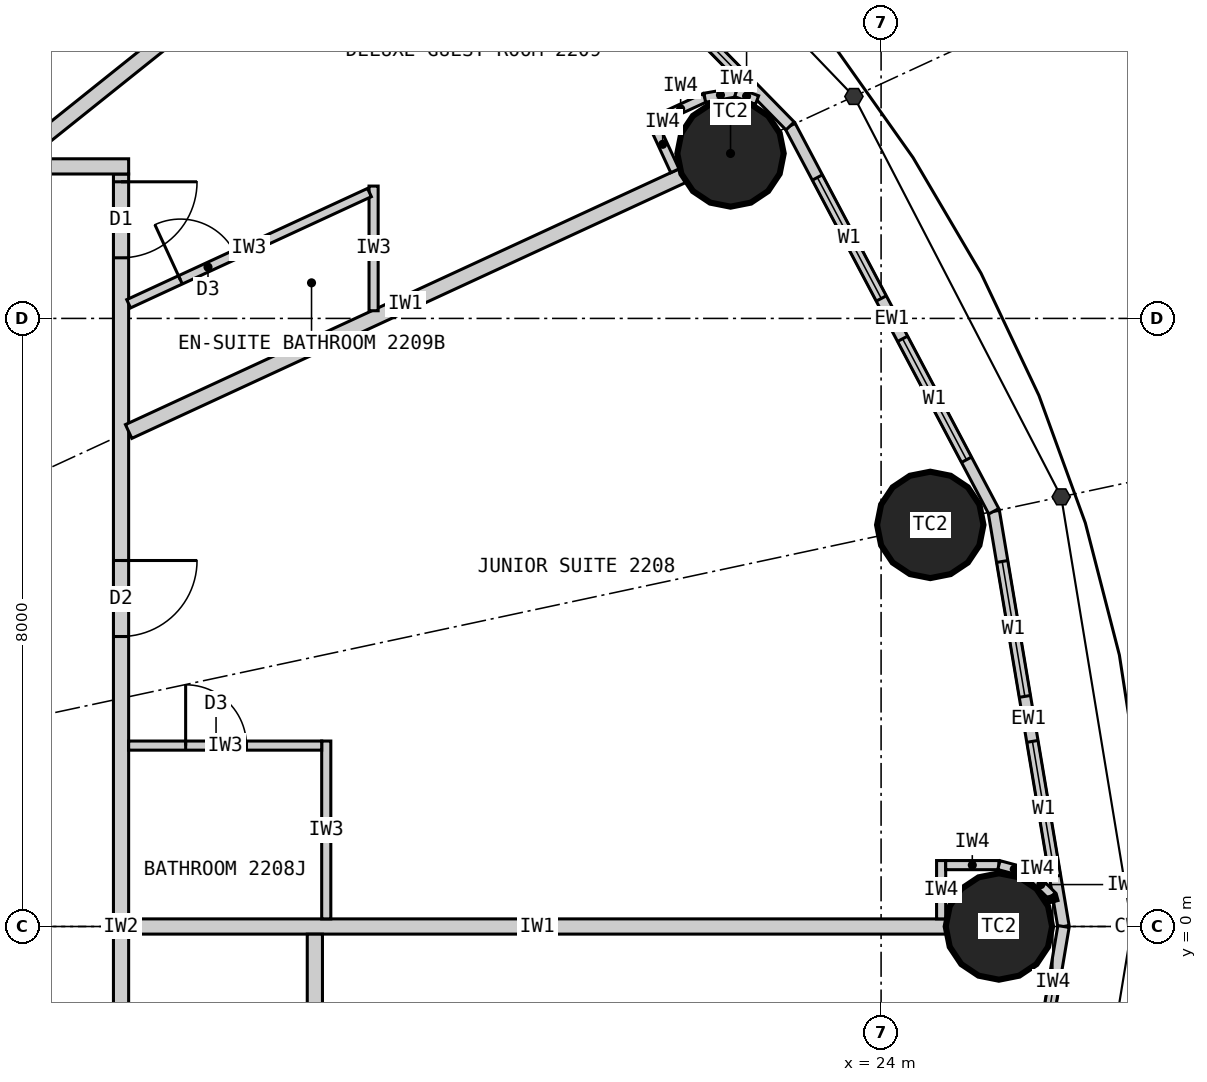
"""IFC4 building model, lengths in metres.
Left out: names, types, materials, properties, quantities, classifications, styles, units other than length and angle.
Written with IfcOpenShell. Run it as: python <this file> out.ifc"""

import sys

from ifc_helpers import new_model, si_unit, direction, frame, frame_2d, origin, origin_2d, place, context, subcontext, project, spatial, rectangle, circle, extrude, element, fill, save


model = new_model("IFC4")
c1 = context("Model", 3, precision=1e-05, world=origin(), true_north=direction((0.0, 1.0)))
c2 = subcontext(c1, "Body", "Model", "MODEL_VIEW")
j1 = project(units=[si_unit("LENGTHUNIT", "METRE"), si_unit("PLANEANGLEUNIT", "RADIAN")], contexts=[c1])
p1 = place(None, origin())
s1 = spatial("IfcSite", under=j1, at=p1, CompositionType="ELEMENT")
p2 = place(p1, origin())
s2 = spatial("IfcBuilding", under=s1, at=p2, CompositionType="ELEMENT")
p3 = place(p2, frame((0.0, 0.0, 87.0)))
s3 = spatial("IfcBuildingStorey", under=s2, at=p3, CompositionType="ELEMENT", Elevation=87.0)
for number, where, z_axis, x_axis in (
    (1, (25.55, 0.0, 0.0), (0.0, 0.0, 1.0), (1.0, 0.0, 0.0)),
    (2, (24.647, 5.283, 0.0), (0.0, 0.0, 1.0), (1.0, 0.0, 0.0)),
    (3, (22.019, 10.17, 0.0), (0.0, 0.0, 1.0), (1.0, 0.0, 0.0)),
):
    element("IfcColumn", number, at=place(p3, frame(where, z_axis=z_axis, x_axis=x_axis)), inside=s3, PredefinedType="COLUMN", context=c2, shape_type="SweptSolid", body=[
        extrude(circle(Radius=0.7, at=origin_2d()), origin(), (0.0, 0.0, 1.0), 3.3),
    ])
p4 = place(p3, frame((26.4, 0.0, 0.0), z_axis=(0.0, 0.0, 1.0), x_axis=(-0.165642551694, 0.986185857264, 0.0)))
e4 = element("IfcWall", 4, at=p4, inside=s3, PredefinedType="ELEMENTEDWALL", context=c2, shape_type="SweptSolid", body=[
    extrude(rectangle(XDim=5.539, YDim=0.15, at=frame_2d((2.77, 0.0))), origin(), (0.0, 0.0, 1.0), 3.12),
])
p5 = place(p4, frame((0.669, 0.0, 0.9)))
e5 = element("IfcOpeningElement", 5, at=p5, cuts=e4, PredefinedType="OPENING", context=c2, shape_type="SweptSolid", body=[
    extrude(rectangle(XDim=1.8, YDim=1.9, at=frame_2d((0.9, 0.95))), frame((0.0, 0.085, 0.0), z_axis=(0.0, -1.0, 0.0), x_axis=(1.0, 0.0, 0.0)), (0.0, 0.0, 1.0), 0.17),
])
p6 = place(p4, frame((3.07, 0.0, 0.9)))
e6 = element("IfcOpeningElement", 6, at=p6, cuts=e4, PredefinedType="OPENING", context=c2, shape_type="SweptSolid", body=[
    extrude(rectangle(XDim=1.8, YDim=1.9, at=frame_2d((0.9, 0.95))), frame((0.0, 0.085, 0.0), z_axis=(0.0, -1.0, 0.0), x_axis=(1.0, 0.0, 0.0)), (0.0, 0.0, 1.0), 0.17),
])
p7 = place(p3, frame((25.482, 5.462, 0.0), z_axis=(0.0, 0.0, 1.0), x_axis=(-0.467296867008, 0.884100468321, 0.0)))
e7 = element("IfcWall", 7, at=p7, inside=s3, PredefinedType="ELEMENTEDWALL", context=c2, shape_type="SweptSolid", body=[
    extrude(rectangle(XDim=5.734, YDim=0.15, at=frame_2d((2.867, 0.0))), origin(), (0.0, 0.0, 1.0), 3.12),
])
p8 = place(p7, frame((0.767, 0.0, 0.9)))
e8 = element("IfcOpeningElement", 8, at=p8, cuts=e7, PredefinedType="OPENING", context=c2, shape_type="SweptSolid", body=[
    extrude(rectangle(XDim=1.8, YDim=1.9, at=frame_2d((0.9, 0.95))), frame((0.0, 0.085, 0.0), z_axis=(0.0, -1.0, 0.0), x_axis=(1.0, 0.0, 0.0)), (0.0, 0.0, 1.0), 0.17),
])
p9 = place(p7, frame((3.167, 0.0, 0.9)))
e9 = element("IfcOpeningElement", 9, at=p9, cuts=e7, PredefinedType="OPENING", context=c2, shape_type="SweptSolid", body=[
    extrude(rectangle(XDim=1.8, YDim=1.9, at=frame_2d((0.9, 0.95))), frame((0.0, 0.085, 0.0), z_axis=(0.0, -1.0, 0.0), x_axis=(1.0, 0.0, 0.0)), (0.0, 0.0, 1.0), 0.17),
])
p10 = place(p3, frame((22.803, 10.532, 0.0), z_axis=(0.0, 0.0, 1.0), x_axis=(-0.699602905915, 0.714531856557, 0.0)))
e10 = element("IfcWall", 10, at=p10, inside=s3, PredefinedType="ELEMENTEDWALL", context=c2, shape_type="SweptSolid", body=[
    extrude(rectangle(XDim=6.051, YDim=0.15, at=frame_2d((3.025, 0.0))), origin(), (0.0, 0.0, 1.0), 3.12),
])
p11 = place(p10, frame((0.926, 0.0, 0.9)))
e11 = element("IfcOpeningElement", 11, at=p11, cuts=e10, PredefinedType="OPENING", context=c2, shape_type="SweptSolid", body=[
    extrude(rectangle(XDim=1.8, YDim=1.9, at=frame_2d((0.9, 0.95))), frame((0.0, 0.085, 0.0), z_axis=(0.0, -1.0, 0.0), x_axis=(1.0, 0.0, 0.0)), (0.0, 0.0, 1.0), 0.17),
])
p12 = place(p10, frame((3.325, 0.0, 0.9)))
e12 = element("IfcOpeningElement", 12, at=p12, cuts=e10, PredefinedType="OPENING", context=c2, shape_type="SweptSolid", body=[
    extrude(rectangle(XDim=1.8, YDim=1.9, at=frame_2d((0.9, 0.95))), frame((0.0, 0.085, 0.0), z_axis=(0.0, -1.0, 0.0), x_axis=(1.0, 0.0, 0.0)), (0.0, 0.0, 1.0), 0.17),
])
p13 = place(p3, frame((25.482, -5.462, 0.0), z_axis=(0.0, 0.0, 1.0), x_axis=(0.165642551694, 0.986185857264, 0.0)))
e13 = element("IfcWall", 13, at=p13, inside=s3, PredefinedType="ELEMENTEDWALL", context=c2, shape_type="SweptSolid", body=[
    extrude(rectangle(XDim=5.539, YDim=0.15, at=frame_2d((2.77, 0.0))), origin(), (0.0, 0.0, 1.0), 3.12),
])
p14 = place(p13, frame((0.669, 0.0, 0.9)))
e14 = element("IfcOpeningElement", 14, at=p14, cuts=e13, PredefinedType="OPENING", context=c2, shape_type="SweptSolid", body=[
    extrude(rectangle(XDim=1.8, YDim=1.9, at=frame_2d((0.9, 0.95))), frame((0.0, 0.085, 0.0), z_axis=(0.0, -1.0, 0.0), x_axis=(1.0, 0.0, 0.0)), (0.0, 0.0, 1.0), 0.17),
])
p15 = place(p13, frame((3.07, 0.0, 0.9)))
e15 = element("IfcOpeningElement", 15, at=p15, cuts=e13, PredefinedType="OPENING", context=c2, shape_type="SweptSolid", body=[
    extrude(rectangle(XDim=1.8, YDim=1.9, at=frame_2d((0.9, 0.95))), frame((0.0, 0.085, 0.0), z_axis=(0.0, -1.0, 0.0), x_axis=(1.0, 0.0, 0.0)), (0.0, 0.0, 1.0), 0.17),
])
p16 = place(p3, frame((14.0, -9.9, 0.0), z_axis=(0.0, 0.0, 1.0), x_axis=(0.0, 1.0, 0.0)))
e16 = element("IfcWall", 16, at=p16, inside=s3, PredefinedType="PARTITIONING", context=c2, shape_type="SweptSolid", body=[
    extrude(rectangle(XDim=19.8, YDim=0.2, at=frame_2d((9.9, 0.0))), origin(), (0.0, 0.0, 1.0), 3.12),
])
p17 = place(p16, frame((0.204, 0.0, 0.0)))
e17 = element("IfcOpeningElement", 17, at=p17, cuts=e16, PredefinedType="OPENING", context=c2, shape_type="SweptSolid", body=[
    extrude(rectangle(XDim=1.0, YDim=2.2, at=frame_2d((0.5, 1.1))), frame((0.0, 0.11, 0.0), z_axis=(0.0, -1.0, 0.0), x_axis=(1.0, 0.0, 0.0)), (0.0, 0.0, 1.0), 0.22),
])
p18 = place(p16, frame((13.715, 0.0, 0.0)))
e18 = element("IfcOpeningElement", 18, at=p18, cuts=e16, PredefinedType="OPENING", context=c2, shape_type="SweptSolid", body=[
    extrude(rectangle(XDim=1.0, YDim=2.2, at=frame_2d((0.5, 1.1))), frame((0.0, 0.11, 0.0), z_axis=(0.0, -1.0, 0.0), x_axis=(1.0, 0.0, 0.0)), (0.0, 0.0, 1.0), 0.22),
])
p19 = place(p16, frame((18.698, 0.0, 0.0)))
e19 = element("IfcOpeningElement", 19, at=p19, cuts=e16, PredefinedType="OPENING", context=c2, shape_type="SweptSolid", body=[
    extrude(rectangle(XDim=1.0, YDim=2.2, at=frame_2d((0.5, 1.1))), frame((0.0, 0.11, 0.0), z_axis=(0.0, -1.0, 0.0), x_axis=(1.0, 0.0, 0.0)), (0.0, 0.0, 1.0), 0.22),
])
p20 = place(p3, frame((14.1, 0.0, 0.0), z_axis=(0.0, 0.0, 1.0), x_axis=(1.0, 0.0, 0.0)))
e20 = element("IfcWall", 20, at=p20, inside=s3, PredefinedType="PARTITIONING", context=c2, shape_type="SweptSolid", body=[
    extrude(rectangle(XDim=10.75, YDim=0.2, at=frame_2d((5.375, 0.0))), origin(), (0.0, 0.0, 1.0), 2.22),
])
p21 = place(p3, frame((14.1, 6.512, 0.0), z_axis=(0.0, 0.0, 1.0), x_axis=(0.907832871056, 0.419332181247, 0.0)))
e21 = element("IfcWall", 21, at=p21, inside=s3, PredefinedType="PARTITIONING", context=c2, shape_type="SweptSolid", body=[
    extrude(rectangle(XDim=8.023, YDim=0.2, at=frame_2d((4.011, 0.0))), origin(), (0.0, 0.0, 1.0), 2.22),
])
p22 = place(p3, frame((12.625, 10.1, 0.0), z_axis=(0.0, 0.0, 1.0), x_axis=(0.780892451574, 0.624665493744, 0.0)))
e22 = element("IfcWall", 22, at=p22, inside=s3, PredefinedType="PARTITIONING", context=c2, shape_type="SweptSolid", body=[
    extrude(rectangle(XDim=6.045, YDim=0.2, at=frame_2d((3.022, 0.0))), origin(), (0.0, 0.0, 1.0), 2.27),
])
p23 = place(p3, frame((16.55, -9.609, 0.0), z_axis=(0.0, 0.0, 1.0), x_axis=(0.0, 1.0, 0.0)))
e23 = element("IfcWall", 23, at=p23, inside=s3, PredefinedType="PARTITIONING", context=c2, shape_type="SweptSolid", body=[
    extrude(rectangle(XDim=9.508, YDim=0.2, at=frame_2d((4.754, 0.0))), origin(), (0.0, 0.0, 1.0), 3.12),
])
p24 = place(p23, frame((6.234, 0.0, 0.0)))
e24 = element("IfcOpeningElement", 24, at=p24, cuts=e23, PredefinedType="OPENING", context=c2, shape_type="SweptSolid", body=[
    extrude(rectangle(XDim=0.8, YDim=2.1, at=frame_2d((0.4, 1.05))), frame((0.0, 0.11, 0.0), z_axis=(0.0, -1.0, 0.0), x_axis=(1.0, 0.0, 0.0)), (0.0, 0.0, 1.0), 0.22),
])
p25 = place(p3, frame((16.7, 0.1, 0.0), z_axis=(0.0, 0.0, 1.0), x_axis=(0.0, 1.0, 0.0)))
e25 = element("IfcWall", 25, at=p25, inside=s3, PredefinedType="PARTITIONING", context=c2, shape_type="SweptSolid", body=[
    extrude(rectangle(XDim=2.34, YDim=0.12, at=frame_2d((1.17, 0.0))), origin(), (0.0, 0.0, 1.0), 3.12),
])
p26 = place(p3, frame((14.1, 2.38, 0.0), z_axis=(0.0, 0.0, 1.0), x_axis=(1.0, 0.0, 0.0)))
e26 = element("IfcWall", 26, at=p26, inside=s3, PredefinedType="PARTITIONING", context=c2, shape_type="SweptSolid", body=[
    extrude(rectangle(XDim=2.54, YDim=0.12, at=frame_2d((1.27, 0.0))), origin(), (0.0, 0.0, 1.0), 3.12),
])
p27 = place(p26, frame((0.75, 0.0, 0.0)))
e27 = element("IfcOpeningElement", 27, at=p27, cuts=e26, PredefinedType="OPENING", context=c2, shape_type="SweptSolid", body=[
    extrude(rectangle(XDim=0.8, YDim=2.1, at=frame_2d((0.4, 1.05))), frame((0.0, 0.07, 0.0), z_axis=(0.0, -1.0, 0.0), x_axis=(1.0, 0.0, 0.0)), (0.0, 0.0, 1.0), 0.14),
])
p28 = place(p3, frame((17.323, 8.101, 0.0), z_axis=(0.0, 0.0, 1.0), x_axis=(0.0, 1.0, 0.0)))
e28 = element("IfcWall", 28, at=p28, inside=s3, PredefinedType="PARTITIONING", context=c2, shape_type="SweptSolid", body=[
    extrude(rectangle(XDim=1.64, YDim=0.12, at=frame_2d((0.82, 0.0))), origin(), (0.0, 0.0, 1.0), 3.12),
])
p29 = place(p3, frame((14.1, 8.193, 0.0), z_axis=(0.0, 0.0, 1.0), x_axis=(0.907836493557, 0.419324338628, 0.0)))
e29 = element("IfcWall", 29, at=p29, inside=s3, PredefinedType="PARTITIONING", context=c2, shape_type="SweptSolid", body=[
    extrude(rectangle(XDim=3.49, YDim=0.12, at=frame_2d((1.745, 0.0))), origin(), (0.0, 0.0, 1.0), 3.12),
])
p30 = place(p29, frame((0.75, 0.0, 0.0)))
e30 = element("IfcOpeningElement", 30, at=p30, cuts=e29, PredefinedType="OPENING", context=c2, shape_type="SweptSolid", body=[
    extrude(rectangle(XDim=0.8, YDim=2.1, at=frame_2d((0.4, 1.05))), frame((0.0, 0.07, 0.0), z_axis=(0.0, -1.0, 0.0), x_axis=(1.0, 0.0, 0.0)), (0.0, 0.0, 1.0), 0.14),
])
p31 = place(p3, frame((10.885, 10.0, 0.0), z_axis=(0.0, 0.0, 1.0), x_axis=(1.0, 0.0, 0.0)))
e31 = element("IfcWall", 31, at=p31, inside=s3, PredefinedType="PARTITIONING", context=c2, shape_type="SweptSolid", body=[
    extrude(rectangle(XDim=3.215, YDim=0.2, at=frame_2d((1.607, 0.0))), origin(), (0.0, 0.0, 1.0), 3.12),
])
p32 = place(p3, frame((24.79, 0.1, 0.0), z_axis=(0.0, 0.0, 1.0), x_axis=(0.0, 1.0, 0.0)))
e32 = element("IfcWall", 32, at=p32, inside=s3, PredefinedType="PARTITIONING", context=c2, shape_type="SweptSolid", body=[
    extrude(rectangle(XDim=0.767, YDim=0.12, at=frame_2d((0.384, 0.0))), origin(), (0.0, 0.0, 1.0), 3.12),
])
p33 = place(p3, frame((24.85, 0.808, 0.0), z_axis=(0.0, 0.0, 1.0), x_axis=(1.0, 0.0, 0.0)))
e33 = element("IfcWall", 33, at=p33, inside=s3, PredefinedType="PARTITIONING", context=c2, shape_type="SweptSolid", body=[
    extrude(rectangle(XDim=0.7, YDim=0.12, at=frame_2d((0.35, 0.0))), origin(), (0.0, 0.0, 1.0), 3.12),
])
p34 = place(p3, frame((25.55, 0.808, 0.0), z_axis=(0.0, 0.0, 1.0), x_axis=(0.965807183573, -0.2592614205, 0.0)))
e34 = element("IfcWall", 34, at=p34, inside=s3, PredefinedType="PARTITIONING", context=c2, shape_type="SweptSolid", body=[
    extrude(rectangle(XDim=0.418, YDim=0.12, at=frame_2d((0.209, 0.0))), origin(), (0.0, 0.0, 1.0), 3.12),
])
p35 = place(p3, frame((25.954, 0.699, 0.0), z_axis=(0.0, 0.0, 1.0), x_axis=(0.707106781187, -0.707106781187, 0.0)))
e35 = element("IfcWall", 35, at=p35, inside=s3, PredefinedType="PARTITIONING", context=c2, shape_type="SweptSolid", body=[
    extrude(rectangle(XDim=0.418, YDim=0.12, at=frame_2d((0.209, 0.0))), origin(), (0.0, 0.0, 1.0), 3.12),
])
p36 = place(p3, frame((26.249, 0.404, 0.0), z_axis=(0.0, 0.0, 1.0), x_axis=(0.259754282609, -0.965674744759, 0.0)))
e36 = element("IfcWall", 36, at=p36, inside=s3, PredefinedType="PARTITIONING", context=c2, shape_type="SweptSolid", body=[
    extrude(rectangle(XDim=0.08, YDim=0.12, at=frame_2d((0.04, 0.0))), origin(), (0.0, 0.0, 1.0), 3.12),
])
p37 = place(p3, frame((21.287, 9.942, 0.0), z_axis=(0.0, 0.0, 1.0), x_axis=(-0.419259891039, 0.907866258744, 0.0)))
e37 = element("IfcWall", 37, at=p37, inside=s3, PredefinedType="PARTITIONING", context=c2, shape_type="SweptSolid", body=[
    extrude(rectangle(XDim=0.768, YDim=0.12, at=frame_2d((0.384, 0.0))), origin(), (0.0, 0.0, 1.0), 3.12),
])
p38 = place(p3, frame((21.045, 10.61, 0.0), z_axis=(0.0, 0.0, 1.0), x_axis=(0.907877701396, 0.419235112208, 0.0)))
e38 = element("IfcWall", 38, at=p38, inside=s3, PredefinedType="PARTITIONING", context=c2, shape_type="SweptSolid", body=[
    extrude(rectangle(XDim=0.7, YDim=0.12, at=frame_2d((0.35, 0.0))), origin(), (0.0, 0.0, 1.0), 3.12),
])
p39 = place(p3, frame((21.68, 10.903, 0.0), z_axis=(0.0, 0.0, 1.0), x_axis=(0.985446622073, 0.169985161247, 0.0)))
e39 = element("IfcWall", 39, at=p39, inside=s3, PredefinedType="PARTITIONING", context=c2, shape_type="SweptSolid", body=[
    extrude(rectangle(XDim=0.418, YDim=0.12, at=frame_2d((0.209, 0.0))), origin(), (0.0, 0.0, 1.0), 3.12),
])
p40 = place(p3, frame((22.092, 10.974, 0.0), z_axis=(0.0, 0.0, 1.0), x_axis=(0.938428160676, -0.345474437912, 0.0)))
e40 = element("IfcWall", 40, at=p40, inside=s3, PredefinedType="PARTITIONING", context=c2, shape_type="SweptSolid", body=[
    extrude(rectangle(XDim=0.294, YDim=0.12, at=frame_2d((0.147, 0.0))), origin(), (0.0, 0.0, 1.0), 3.12),
])
p41 = place(p5, origin())
e41 = element("IfcWindow", 41, at=p41, inside=s3, PartitioningType="SINGLE_PANEL", PredefinedType="WINDOW", context=c2, shape_type="SweptSolid", body=[
    extrude(rectangle(XDim=1.8, YDim=1.9, at=frame_2d((0.9, 0.95))), frame((0.0, 0.03, 0.0), z_axis=(0.0, -1.0, 0.0), x_axis=(1.0, 0.0, 0.0)), (0.0, 0.0, 1.0), 0.06),
])
fill(e5, e41)
p42 = place(p6, origin())
e42 = element("IfcWindow", 42, at=p42, inside=s3, PartitioningType="SINGLE_PANEL", PredefinedType="WINDOW", context=c2, shape_type="SweptSolid", body=[
    extrude(rectangle(XDim=1.8, YDim=1.9, at=frame_2d((0.9, 0.95))), frame((0.0, 0.03, 0.0), z_axis=(0.0, -1.0, 0.0), x_axis=(1.0, 0.0, 0.0)), (0.0, 0.0, 1.0), 0.06),
])
fill(e6, e42)
p43 = place(p8, origin())
e43 = element("IfcWindow", 43, at=p43, inside=s3, PartitioningType="SINGLE_PANEL", PredefinedType="WINDOW", context=c2, shape_type="SweptSolid", body=[
    extrude(rectangle(XDim=1.8, YDim=1.9, at=frame_2d((0.9, 0.95))), frame((0.0, 0.03, 0.0), z_axis=(0.0, -1.0, 0.0), x_axis=(1.0, 0.0, 0.0)), (0.0, 0.0, 1.0), 0.06),
])
fill(e8, e43)
p44 = place(p9, origin())
e44 = element("IfcWindow", 44, at=p44, inside=s3, PartitioningType="SINGLE_PANEL", PredefinedType="WINDOW", context=c2, shape_type="SweptSolid", body=[
    extrude(rectangle(XDim=1.8, YDim=1.9, at=frame_2d((0.9, 0.95))), frame((0.0, 0.03, 0.0), z_axis=(0.0, -1.0, 0.0), x_axis=(1.0, 0.0, 0.0)), (0.0, 0.0, 1.0), 0.06),
])
fill(e9, e44)
p45 = place(p11, origin())
e45 = element("IfcWindow", 45, at=p45, inside=s3, PartitioningType="SINGLE_PANEL", PredefinedType="WINDOW", context=c2, shape_type="SweptSolid", body=[
    extrude(rectangle(XDim=1.8, YDim=1.9, at=frame_2d((0.9, 0.95))), frame((0.0, 0.03, 0.0), z_axis=(0.0, -1.0, 0.0), x_axis=(1.0, 0.0, 0.0)), (0.0, 0.0, 1.0), 0.06),
])
fill(e11, e45)
p46 = place(p15, origin())
e46 = element("IfcWindow", 46, at=p46, inside=s3, PartitioningType="SINGLE_PANEL", PredefinedType="WINDOW", context=c2, shape_type="SweptSolid", body=[
    extrude(rectangle(XDim=1.8, YDim=1.9, at=frame_2d((0.9, 0.95))), frame((0.0, 0.03, 0.0), z_axis=(0.0, -1.0, 0.0), x_axis=(1.0, 0.0, 0.0)), (0.0, 0.0, 1.0), 0.06),
])
fill(e15, e46)
p47 = place(p27, origin())
e47 = element("IfcDoor", 47, at=p47, inside=s3, OperationType="SINGLE_SWING_LEFT", PredefinedType="DOOR", context=c2, shape_type="SweptSolid", body=[
    extrude(rectangle(XDim=0.8, YDim=2.1, at=frame_2d((0.4, 1.05))), frame((0.0, 0.025, 0.0), z_axis=(0.0, -1.0, 0.0), x_axis=(1.0, 0.0, 0.0)), (0.0, 0.0, 1.0), 0.05),
])
fill(e27, e47)
p48 = place(p18, origin())
e48 = element("IfcDoor", 48, at=p48, inside=s3, OperationType="SINGLE_SWING_RIGHT", PredefinedType="DOOR", context=c2, shape_type="SweptSolid", body=[
    extrude(rectangle(XDim=1.0, YDim=2.2, at=frame_2d((0.5, 1.1))), frame((0.0, 0.025, 0.0), z_axis=(0.0, -1.0, 0.0), x_axis=(1.0, 0.0, 0.0)), (0.0, 0.0, 1.0), 0.05),
])
fill(e18, e48)
p49 = place(p30, origin())
e49 = element("IfcDoor", 49, at=p49, inside=s3, OperationType="SINGLE_SWING_LEFT", PredefinedType="DOOR", context=c2, shape_type="SweptSolid", body=[
    extrude(rectangle(XDim=0.8, YDim=2.1, at=frame_2d((0.4, 1.05))), frame((0.0, 0.025, 0.0), z_axis=(0.0, -1.0, 0.0), x_axis=(1.0, 0.0, 0.0)), (0.0, 0.0, 1.0), 0.05),
])
fill(e30, e49)
p50 = place(p19, origin())
e50 = element("IfcDoor", 50, at=p50, inside=s3, OperationType="SINGLE_SWING_RIGHT", PredefinedType="DOOR", context=c2, shape_type="SweptSolid", body=[
    extrude(rectangle(XDim=1.0, YDim=2.2, at=frame_2d((0.5, 1.1))), frame((0.0, 0.025, 0.0), z_axis=(0.0, -1.0, 0.0), x_axis=(1.0, 0.0, 0.0)), (0.0, 0.0, 1.0), 0.05),
])
fill(e19, e50)
save(model, sys.argv[1])
